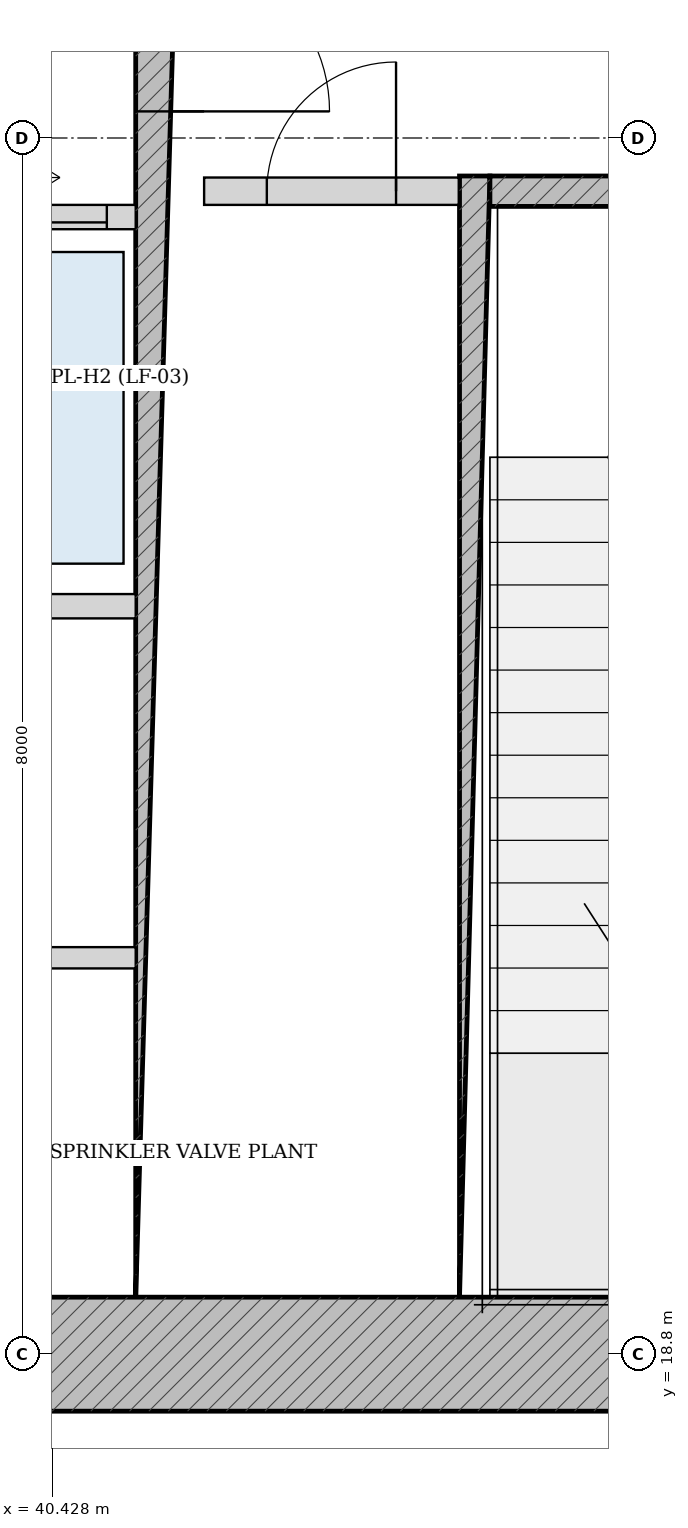
"""IFC4 building model, lengths in metres.
Left out: names, types, materials, properties, quantities, classifications, styles, units other than length and angle.
Written with IfcOpenShell. Run it as: python <this file> out.ifc"""

import sys

from ifc_helpers import new_model, si_unit, direction, frame, frame_2d, origin, place, context, subcontext, project, spatial, rectangle, extrude, source, transform, mapped, element, fill, save


model = new_model("IFC4")
c1 = context("Model", 3, precision=1e-05, world=origin(), true_north=direction((-0.2419218956, 0.970295726276)))
c2 = subcontext(c1, "Body", "Model", "MODEL_VIEW")
j1 = project(units=[si_unit("LENGTHUNIT", "METRE"), si_unit("PLANEANGLEUNIT", "RADIAN")], contexts=[c1])
p1 = place(None, origin())
s1 = spatial("IfcSite", under=j1, at=p1, CompositionType="ELEMENT")
p2 = place(p1, origin())
s2 = spatial("IfcBuilding", under=s1, at=p2, CompositionType="ELEMENT")
p3 = place(p2, origin())
s3 = spatial("IfcBuildingStorey", under=s2, at=p3, CompositionType="ELEMENT", Elevation=0.0)
p4 = place(p3, frame((28.625, 18.8, 0.0), z_axis=(0.0, 0.0, 1.0), x_axis=(1.0, 0.0, 0.0)))
e1 = element("IfcWall", 1, at=p4, inside=s3, PredefinedType="SHEAR", context=c2, shape_type="SweptSolid", body=[
    extrude(rectangle(XDim=18.75, YDim=0.75, at=frame_2d((9.375, 0.0))), origin(), (0.0, 0.0, 1.0), 5.1),
])
p5 = place(p4, frame((7.627, 0.0, 0.0)))
e2 = element("IfcOpeningElement", 2, at=p5, cuts=e1, PredefinedType="OPENING", context=c2, shape_type="SweptSolid", body=[
    extrude(rectangle(XDim=0.85, YDim=2.1, at=frame_2d((0.425, 1.05))), frame((0.0, 0.385, 0.0), z_axis=(0.0, -1.0, 0.0), x_axis=(1.0, 0.0, 0.0)), (0.0, 0.0, 1.0), 0.77),
])
p6 = place(p4, frame((10.673, 0.0, 0.0)))
e3 = element("IfcOpeningElement", 3, at=p6, cuts=e1, PredefinedType="OPENING", context=c2, shape_type="SweptSolid", body=[
    extrude(rectangle(XDim=0.85, YDim=2.1, at=frame_2d((0.425, 1.05))), frame((0.0, 0.385, 0.0), z_axis=(0.0, -1.0, 0.0), x_axis=(1.0, 0.0, 0.0)), (0.0, 0.0, 1.0), 0.77),
])
p7 = place(p3, frame((43.205, 19.175, 0.0), z_axis=(0.0, 0.0, 1.0), x_axis=(0.0, 1.0, 0.0)))
e4 = element("IfcWall", 4, at=p7, inside=s3, PredefinedType="SOLIDWALL", context=c2, shape_type="SweptSolid", body=[
    extrude(rectangle(XDim=7.375, YDim=0.2, at=frame_2d((3.688, 0.0))), origin(), (0.0, 0.0, 1.0), 5.1),
])
p8 = place(p3, frame((43.305, 26.45, 0.0), z_axis=(0.0, 0.0, 1.0), x_axis=(1.0, 0.0, 0.0)))
e5 = element("IfcWall", 5, at=p8, inside=s3, PredefinedType="SOLIDWALL", context=c2, shape_type="SweptSolid", body=[
    extrude(rectangle(XDim=3.32, YDim=0.2, at=frame_2d((1.66, 0.0))), origin(), (0.0, 0.0, 1.0), 5.1),
])
p9 = place(p8, frame((1.185, 0.0, 0.0)))
e6 = element("IfcOpeningElement", 6, at=p9, cuts=e5, PredefinedType="OPENING", context=c2, shape_type="SweptSolid", body=[
    extrude(rectangle(XDim=0.95, YDim=2.15, at=frame_2d((0.475, 1.075))), frame((0.0, 0.11, 0.0), z_axis=(0.0, -1.0, 0.0), x_axis=(1.0, 0.0, 0.0)), (0.0, 0.0, 1.0), 0.22),
])
p10 = place(p3, frame((41.2, 19.175, 0.0), z_axis=(0.0, 0.0, 1.0), x_axis=(0.0, 1.0, 0.0)))
e7 = element("IfcWall", 7, at=p10, inside=s3, PredefinedType="SHEAR", context=c2, shape_type="SweptSolid", body=[
    extrude(rectangle(XDim=15.25, YDim=0.45, at=frame_2d((7.625, 0.0))), origin(), (0.0, 0.0, 1.0), 5.1),
])
p11 = place(p10, frame((7.8, 0.0, 0.0)))
e8 = element("IfcOpeningElement", 8, at=p11, cuts=e7, PredefinedType="OPENING", context=c2, shape_type="SweptSolid", body=[
    extrude(rectangle(XDim=1.05, YDim=2.15, at=frame_2d((0.525, 1.075))), frame((0.0, 0.235, 0.0), z_axis=(0.0, -1.0, 0.0), x_axis=(1.0, 0.0, 0.0)), (0.0, 0.0, 1.0), 0.47),
])
p12 = place(p3, frame((41.425, 26.45, 0.0), z_axis=(0.0, 0.0, 1.0), x_axis=(1.0, 0.0, 0.0)))
e9 = element("IfcWall", 9, at=p12, inside=s3, PredefinedType="PARTITIONING", context=c2, shape_type="SweptSolid", body=[
    extrude(rectangle(XDim=1.675, YDim=0.18, at=frame_2d((0.837, 0.0))), origin(), (0.0, 0.0, 1.0), 5.1),
])
p13 = place(p12, frame((0.413, 0.0, 0.0)))
e10 = element("IfcOpeningElement", 10, at=p13, cuts=e9, PredefinedType="OPENING", context=c2, shape_type="SweptSolid", body=[
    extrude(rectangle(XDim=0.85, YDim=2.1, at=frame_2d((0.425, 1.05))), frame((0.0, 0.1, 0.0), z_axis=(0.0, -1.0, 0.0), x_axis=(1.0, 0.0, 0.0)), (0.0, 0.0, 1.0), 0.2),
])
p14 = place(p3, frame((35.025, 26.28, 0.0), z_axis=(0.0, 0.0, 1.0), x_axis=(1.0, 0.0, 0.0)))
e11 = element("IfcWall", 11, at=p14, inside=s3, PredefinedType="PARTITIONING", context=c2, shape_type="SweptSolid", body=[
    extrude(rectangle(XDim=5.95, YDim=0.16, at=frame_2d((2.975, 0.0))), origin(), (0.0, 0.0, 1.0), 5.1),
])
p15 = place(p14, frame((0.19, 0.0, 0.0)))
e12 = element("IfcOpeningElement", 12, at=p15, cuts=e11, PredefinedType="OPENING", context=c2, shape_type="SweptSolid", body=[
    extrude(rectangle(XDim=1.1, YDim=2.2, at=frame_2d((0.55, 1.1))), frame((0.0, 0.09, 0.0), z_axis=(0.0, -1.0, 0.0), x_axis=(1.0, 0.0, 0.0)), (0.0, 0.0, 1.0), 0.18),
])
p16 = place(p14, frame((1.67, 0.0, 0.0)))
e13 = element("IfcOpeningElement", 13, at=p16, cuts=e11, PredefinedType="OPENING", context=c2, shape_type="SweptSolid", body=[
    extrude(rectangle(XDim=1.1, YDim=2.2, at=frame_2d((0.55, 1.1))), frame((0.0, 0.09, 0.0), z_axis=(0.0, -1.0, 0.0), x_axis=(1.0, 0.0, 0.0)), (0.0, 0.0, 1.0), 0.18),
])
p17 = place(p14, frame((3.18, 0.0, 0.0)))
e14 = element("IfcOpeningElement", 14, at=p17, cuts=e11, PredefinedType="OPENING", context=c2, shape_type="SweptSolid", body=[
    extrude(rectangle(XDim=1.1, YDim=2.2, at=frame_2d((0.55, 1.1))), frame((0.0, 0.09, 0.0), z_axis=(0.0, -1.0, 0.0), x_axis=(1.0, 0.0, 0.0)), (0.0, 0.0, 1.0), 0.18),
])
p18 = place(p14, frame((4.66, 0.0, 0.0)))
e15 = element("IfcOpeningElement", 15, at=p18, cuts=e11, PredefinedType="OPENING", context=c2, shape_type="SweptSolid", body=[
    extrude(rectangle(XDim=1.1, YDim=2.2, at=frame_2d((0.55, 1.1))), frame((0.0, 0.09, 0.0), z_axis=(0.0, -1.0, 0.0), x_axis=(1.0, 0.0, 0.0)), (0.0, 0.0, 1.0), 0.18),
])
p19 = place(p3, frame((35.025, 23.72, 0.0), z_axis=(0.0, 0.0, 1.0), x_axis=(1.0, 0.0, 0.0)))
e16 = element("IfcWall", 16, at=p19, inside=s3, PredefinedType="PARTITIONING", context=c2, shape_type="SweptSolid", body=[
    extrude(rectangle(XDim=5.95, YDim=0.16, at=frame_2d((2.975, 0.0))), origin(), (0.0, 0.0, 1.0), 5.1),
])
p20 = place(p3, frame((38.4, 21.407, 0.0), z_axis=(0.0, 0.0, 1.0), x_axis=(1.0, 0.0, 0.0)))
e17 = element("IfcWall", 17, at=p20, inside=s3, PredefinedType="PARTITIONING", context=c2, shape_type="SweptSolid", body=[
    extrude(rectangle(XDim=2.575, YDim=0.14, at=frame_2d((1.288, 0.0))), origin(), (0.0, 0.0, 1.0), 5.1),
])
p21 = place(p20, frame((0.863, 0.0, 0.0)))
e18 = element("IfcOpeningElement", 18, at=p21, cuts=e17, PredefinedType="OPENING", context=c2, shape_type="SweptSolid", body=[
    extrude(rectangle(XDim=0.85, YDim=2.1, at=frame_2d((0.425, 1.05))), frame((0.0, 0.08, 0.0), z_axis=(0.0, -1.0, 0.0), x_axis=(1.0, 0.0, 0.0)), (0.0, 0.0, 1.0), 0.16),
])
m1 = source(origin(), c2, "Body", "SweptSolid", [
    extrude(rectangle(XDim=1.05, YDim=2.15, at=frame_2d((0.525, 1.075))), frame((0.0, 0.025, 0.0), z_axis=(0.0, -1.0, 0.0), x_axis=(1.0, 0.0, 0.0)), (0.0, 0.0, 1.0), 0.05),
])
p22 = place(p11, frame((1.05, 0.0, 0.0), z_axis=(0.0, 0.0, 1.0), x_axis=(-1.0, 0.0, 0.0)))
e19 = element("IfcDoor", 19, at=p22, inside=s3, OperationType="SINGLE_SWING_RIGHT", PredefinedType="DOOR", context=c2, shape_type="MappedRepresentation", body=[
    mapped(m1, transform((0.0, 0.0, 0.0), scale=1.0)),
])
fill(e8, e19)
m2 = source(origin(), c2, "Body", "SweptSolid", [
    extrude(rectangle(XDim=0.85, YDim=2.1, at=frame_2d((0.425, 1.05))), frame((0.0, 0.025, 0.0), z_axis=(0.0, -1.0, 0.0), x_axis=(1.0, 0.0, 0.0)), (0.0, 0.0, 1.0), 0.05),
])
p23 = place(p13, origin())
e20 = element("IfcDoor", 20, at=p23, inside=s3, OperationType="SINGLE_SWING_RIGHT", PredefinedType="DOOR", context=c2, shape_type="MappedRepresentation", body=[
    mapped(m2, transform((0.0, 0.0, 0.0), scale=1.0)),
])
fill(e10, e20)
m3 = source(origin(), c2, "Body", "SweptSolid", [
    extrude(rectangle(XDim=1.1, YDim=2.2, at=frame_2d((0.55, 1.1))), frame((0.0, 0.025, 0.0), z_axis=(0.0, -1.0, 0.0), x_axis=(1.0, 0.0, 0.0)), (0.0, 0.0, 1.0), 0.05),
])
p24 = place(p18, origin())
e21 = element("IfcDoor", 21, at=p24, inside=s3, OperationType="DOUBLE_DOOR_SLIDING", PredefinedType="DOOR", context=c2, shape_type="MappedRepresentation", body=[
    mapped(m3, transform((0.0, 0.0, 0.0), scale=1.0)),
])
fill(e15, e21)
save(model, sys.argv[1])
